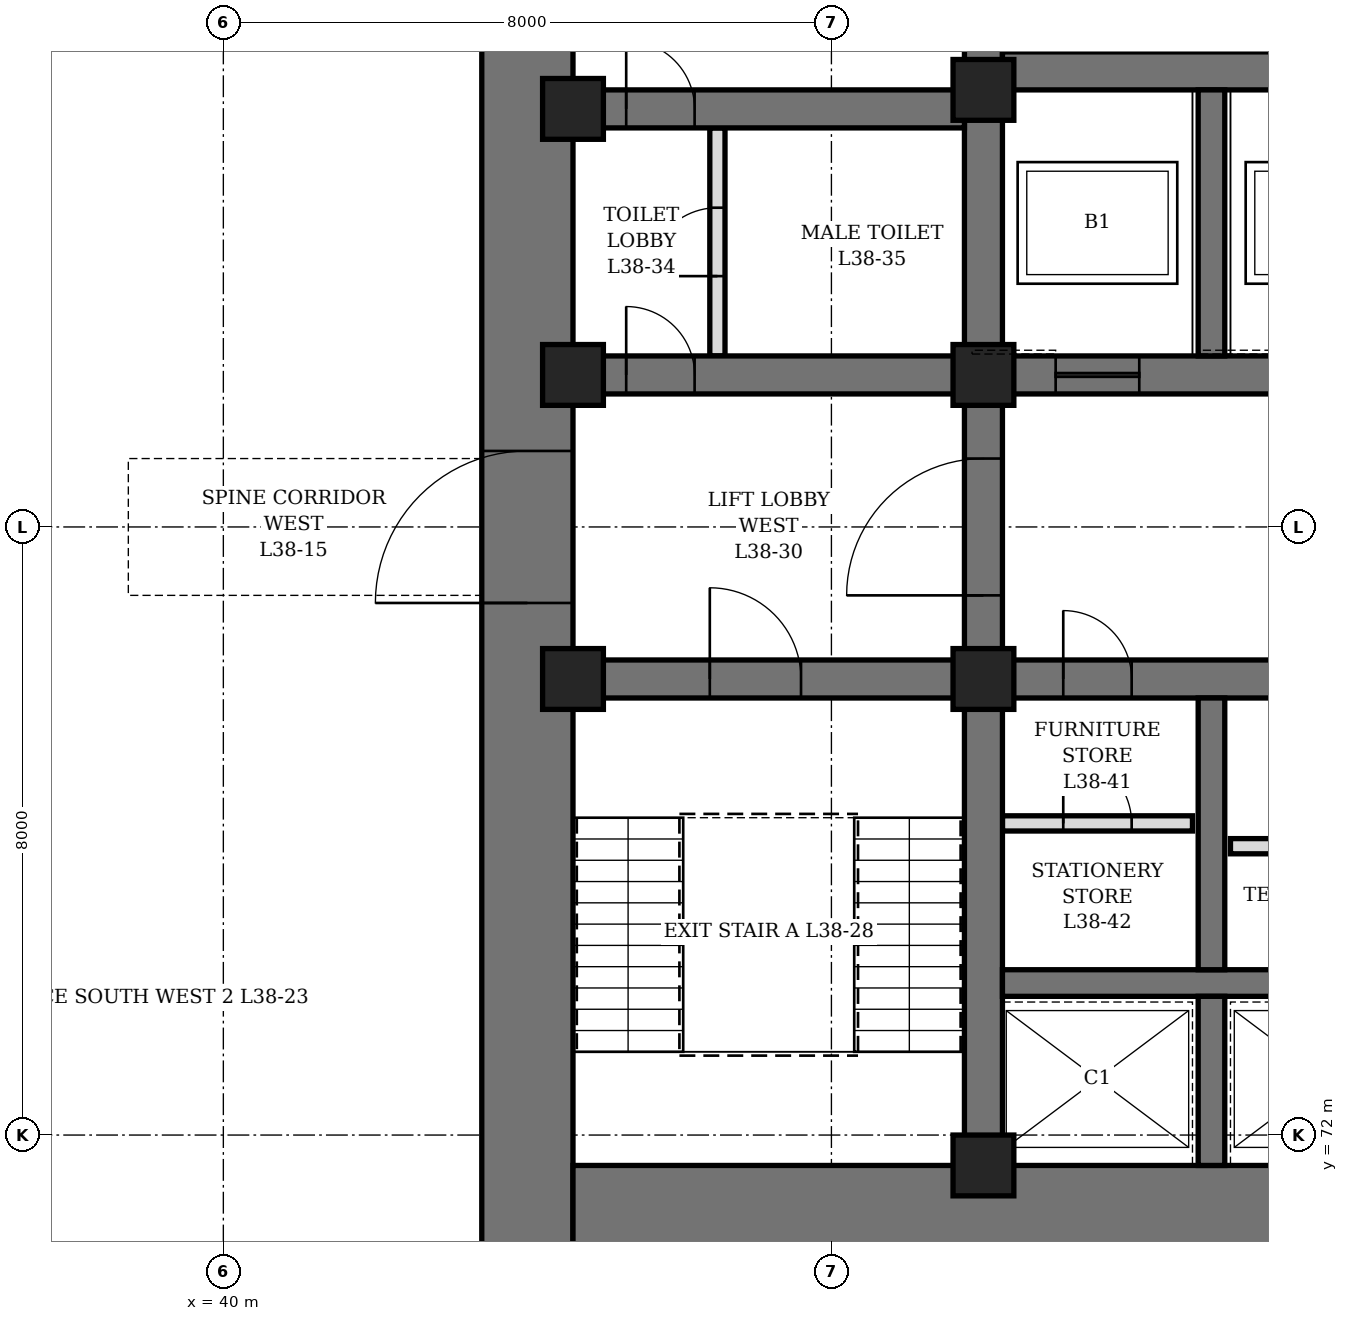
"""IFC4 building model, lengths in metres.
Left out: names, types, materials, properties, quantities, classifications, styles, units other than length and angle.
Written with IfcOpenShell. Run it as: python <this file> out.ifc"""

import sys

from ifc_helpers import new_model, si_unit, direction, frame, frame_2d, origin, origin_2d, place, context, subcontext, project, spatial, rectangle, hollow_rectangle, extrude, element, fill, save


model = new_model("IFC4")
c1 = context("Model", 3, precision=1e-05, world=origin(), true_north=direction((0.0, 1.0)))
c2 = subcontext(c1, "Body", "Model", "MODEL_VIEW")
j1 = project(units=[si_unit("LENGTHUNIT", "METRE"), si_unit("PLANEANGLEUNIT", "RADIAN")], contexts=[c1])
p1 = place(None, origin())
s1 = spatial("IfcSite", under=j1, at=p1, CompositionType="ELEMENT")
p2 = place(p1, origin())
s2 = spatial("IfcBuilding", under=s1, at=p2, CompositionType="ELEMENT")
p3 = place(p2, frame((0.0, 0.0, 171.1)))
s3 = spatial("IfcBuildingStorey", under=s2, at=p3, CompositionType="ELEMENT", Elevation=171.1)
p4 = place(p3, frame((44.0, 70.4, 0.0), z_axis=(0.0, 0.0, 1.0), x_axis=(0.0, 1.0, 0.0)))
e1 = element("IfcWall", 1, at=p4, inside=s3, PredefinedType="SHEAR", context=c2, shape_type="SweptSolid", body=[
    extrude(rectangle(XDim=19.2, YDim=1.2, at=frame_2d((9.6, 0.0))), origin(), (0.0, 0.0, 1.0), 4.2),
])
p5 = place(p4, frame((8.6, 0.0, 0.0)))
e2 = element("IfcOpeningElement", 2, at=p5, cuts=e1, PredefinedType="OPENING", context=c2, shape_type="SweptSolid", body=[
    extrude(rectangle(XDim=2.0, YDim=2.4, at=frame_2d((1.0, 1.2))), frame((0.0, 0.61, 0.0), z_axis=(0.0, -1.0, 0.0), x_axis=(1.0, 0.0, 0.0)), (0.0, 0.0, 1.0), 1.22),
])
p6 = place(p3, frame((44.6, 71.0, 0.0), z_axis=(0.0, 0.0, 1.0), x_axis=(1.0, 0.0, 0.0)))
e3 = element("IfcWall", 3, at=p6, inside=s3, PredefinedType="SHEAR", context=c2, shape_type="SweptSolid", body=[
    extrude(rectangle(XDim=22.8, YDim=1.2, at=frame_2d((11.4, 0.0))), origin(), (0.0, 0.0, 1.0), 4.2),
])
p7 = place(p3, frame((50.0, 71.6, 0.0), z_axis=(0.0, 0.0, 1.0), x_axis=(0.0, 1.0, 0.0)))
e4 = element("IfcWall", 4, at=p7, inside=s3, PredefinedType="SHEAR", context=c2, shape_type="SweptSolid", body=[
    extrude(rectangle(XDim=16.8, YDim=0.5, at=frame_2d((8.4, 0.0))), origin(), (0.0, 0.0, 1.0), 4.2),
])
p8 = place(p7, frame((7.5, 0.0, 0.0)))
e5 = element("IfcOpeningElement", 5, at=p8, cuts=e4, PredefinedType="OPENING", context=c2, shape_type="SweptSolid", body=[
    extrude(rectangle(XDim=1.8, YDim=2.4, at=frame_2d((0.9, 1.2))), frame((0.0, 0.26, 0.0), z_axis=(0.0, -1.0, 0.0), x_axis=(1.0, 0.0, 0.0)), (0.0, 0.0, 1.0), 0.52),
])
p9 = place(p3, frame((44.6, 78.0, 0.0), z_axis=(0.0, 0.0, 1.0), x_axis=(1.0, 0.0, 0.0)))
e6 = element("IfcWall", 6, at=p9, inside=s3, PredefinedType="SHEAR", context=c2, shape_type="SweptSolid", body=[
    extrude(rectangle(XDim=5.15, YDim=0.5, at=frame_2d((2.575, 0.0))), origin(), (0.0, 0.0, 1.0), 4.2),
])
p10 = place(p9, frame((1.8, 0.0, 0.0)))
e7 = element("IfcOpeningElement", 7, at=p10, cuts=e6, PredefinedType="OPENING", context=c2, shape_type="SweptSolid", body=[
    extrude(rectangle(XDim=1.2, YDim=2.1, at=frame_2d((0.6, 1.05))), frame((0.0, 0.26, 0.0), z_axis=(0.0, -1.0, 0.0), x_axis=(1.0, 0.0, 0.0)), (0.0, 0.0, 1.0), 0.52),
])
p11 = place(p3, frame((44.6, 82.0, 0.0), z_axis=(0.0, 0.0, 1.0), x_axis=(1.0, 0.0, 0.0)))
e8 = element("IfcWall", 8, at=p11, inside=s3, PredefinedType="SHEAR", context=c2, shape_type="SweptSolid", body=[
    extrude(rectangle(XDim=5.15, YDim=0.5, at=frame_2d((2.575, 0.0))), origin(), (0.0, 0.0, 1.0), 4.2),
])
p12 = place(p11, frame((0.7, 0.0, 0.0)))
e9 = element("IfcOpeningElement", 9, at=p12, cuts=e8, PredefinedType="OPENING", context=c2, shape_type="SweptSolid", body=[
    extrude(rectangle(XDim=0.9, YDim=2.1, at=frame_2d((0.45, 1.05))), frame((0.0, 0.26, 0.0), z_axis=(0.0, -1.0, 0.0), x_axis=(1.0, 0.0, 0.0)), (0.0, 0.0, 1.0), 0.52),
])
p13 = place(p3, frame((44.6, 85.5, 0.0), z_axis=(0.0, 0.0, 1.0), x_axis=(1.0, 0.0, 0.0)))
e10 = element("IfcWall", 10, at=p13, inside=s3, PredefinedType="SHEAR", context=c2, shape_type="SweptSolid", body=[
    extrude(rectangle(XDim=5.15, YDim=0.5, at=frame_2d((2.575, 0.0))), origin(), (0.0, 0.0, 1.0), 4.2),
])
p14 = place(p13, frame((0.7, 0.0, 0.0)))
e11 = element("IfcOpeningElement", 11, at=p14, cuts=e10, PredefinedType="OPENING", context=c2, shape_type="SweptSolid", body=[
    extrude(rectangle(XDim=0.9, YDim=2.1, at=frame_2d((0.45, 1.05))), frame((0.0, 0.26, 0.0), z_axis=(0.0, -1.0, 0.0), x_axis=(1.0, 0.0, 0.0)), (0.0, 0.0, 1.0), 0.52),
])
p15 = place(p3, frame((50.25, 78.0, 0.0), z_axis=(0.0, 0.0, 1.0), x_axis=(1.0, 0.0, 0.0)))
e12 = element("IfcWall", 12, at=p15, inside=s3, PredefinedType="SHEAR", context=c2, shape_type="SweptSolid", body=[
    extrude(rectangle(XDim=11.5, YDim=0.5, at=frame_2d((5.75, 0.0))), origin(), (0.0, 0.0, 1.0), 4.2),
])
p16 = place(p15, frame((0.8, 0.0, 0.0)))
e13 = element("IfcOpeningElement", 13, at=p16, cuts=e12, PredefinedType="OPENING", context=c2, shape_type="SweptSolid", body=[
    extrude(rectangle(XDim=0.9, YDim=2.1, at=frame_2d((0.45, 1.05))), frame((0.0, 0.26, 0.0), z_axis=(0.0, -1.0, 0.0), x_axis=(1.0, 0.0, 0.0)), (0.0, 0.0, 1.0), 0.52),
])
p17 = place(p15, frame((3.8, 0.0, 0.0)))
e14 = element("IfcOpeningElement", 14, at=p17, cuts=e12, PredefinedType="OPENING", context=c2, shape_type="SweptSolid", body=[
    extrude(rectangle(XDim=0.9, YDim=2.1, at=frame_2d((0.45, 1.05))), frame((0.0, 0.26, 0.0), z_axis=(0.0, -1.0, 0.0), x_axis=(1.0, 0.0, 0.0)), (0.0, 0.0, 1.0), 0.52),
])
p18 = place(p15, frame((6.8, 0.0, 0.0)))
e15 = element("IfcOpeningElement", 15, at=p18, cuts=e12, PredefinedType="OPENING", context=c2, shape_type="SweptSolid", body=[
    extrude(rectangle(XDim=0.9, YDim=2.1, at=frame_2d((0.45, 1.05))), frame((0.0, 0.26, 0.0), z_axis=(0.0, -1.0, 0.0), x_axis=(1.0, 0.0, 0.0)), (0.0, 0.0, 1.0), 0.52),
])
p19 = place(p15, frame((9.8, 0.0, 0.0)))
e16 = element("IfcOpeningElement", 16, at=p19, cuts=e12, PredefinedType="OPENING", context=c2, shape_type="SweptSolid", body=[
    extrude(rectangle(XDim=0.9, YDim=2.1, at=frame_2d((0.45, 1.05))), frame((0.0, 0.26, 0.0), z_axis=(0.0, -1.0, 0.0), x_axis=(1.0, 0.0, 0.0)), (0.0, 0.0, 1.0), 0.52),
])
p20 = place(p3, frame((50.25, 82.0, 0.0), z_axis=(0.0, 0.0, 1.0), x_axis=(1.0, 0.0, 0.0)))
e17 = element("IfcWall", 17, at=p20, inside=s3, PredefinedType="SHEAR", context=c2, shape_type="SweptSolid", body=[
    extrude(rectangle(XDim=11.5, YDim=0.5, at=frame_2d((5.75, 0.0))), origin(), (0.0, 0.0, 1.0), 4.2),
])
p21 = place(p20, frame((0.7, 0.0, 0.0)))
e18 = element("IfcOpeningElement", 18, at=p21, cuts=e17, PredefinedType="OPENING", context=c2, shape_type="SweptSolid", body=[
    extrude(rectangle(XDim=1.1, YDim=2.2, at=frame_2d((0.55, 1.1))), frame((0.0, 0.26, 0.0), z_axis=(0.0, -1.0, 0.0), x_axis=(1.0, 0.0, 0.0)), (0.0, 0.0, 1.0), 0.52),
])
p22 = place(p20, frame((3.7, 0.0, 0.0)))
e19 = element("IfcOpeningElement", 19, at=p22, cuts=e17, PredefinedType="OPENING", context=c2, shape_type="SweptSolid", body=[
    extrude(rectangle(XDim=1.1, YDim=2.2, at=frame_2d((0.55, 1.1))), frame((0.0, 0.26, 0.0), z_axis=(0.0, -1.0, 0.0), x_axis=(1.0, 0.0, 0.0)), (0.0, 0.0, 1.0), 0.52),
])
p23 = place(p20, frame((6.7, 0.0, 0.0)))
e20 = element("IfcOpeningElement", 20, at=p23, cuts=e17, PredefinedType="OPENING", context=c2, shape_type="SweptSolid", body=[
    extrude(rectangle(XDim=1.1, YDim=2.2, at=frame_2d((0.55, 1.1))), frame((0.0, 0.26, 0.0), z_axis=(0.0, -1.0, 0.0), x_axis=(1.0, 0.0, 0.0)), (0.0, 0.0, 1.0), 0.52),
])
p24 = place(p20, frame((9.7, 0.0, 0.0)))
e21 = element("IfcOpeningElement", 21, at=p24, cuts=e17, PredefinedType="OPENING", context=c2, shape_type="SweptSolid", body=[
    extrude(rectangle(XDim=1.1, YDim=2.2, at=frame_2d((0.55, 1.1))), frame((0.0, 0.26, 0.0), z_axis=(0.0, -1.0, 0.0), x_axis=(1.0, 0.0, 0.0)), (0.0, 0.0, 1.0), 0.52),
])
p25 = place(p3, frame((50.25, 86.0, 0.0), z_axis=(0.0, 0.0, 1.0), x_axis=(1.0, 0.0, 0.0)))
e22 = element("IfcWall", 22, at=p25, inside=s3, PredefinedType="SHEAR", context=c2, shape_type="SweptSolid", body=[
    extrude(rectangle(XDim=11.5, YDim=0.5, at=frame_2d((5.75, 0.0))), origin(), (0.0, 0.0, 1.0), 4.2),
])
p26 = place(p3, frame((50.25, 74.0, 0.0), z_axis=(0.0, 0.0, 1.0), x_axis=(1.0, 0.0, 0.0)))
e23 = element("IfcWall", 23, at=p26, inside=s3, PredefinedType="SHEAR", context=c2, shape_type="SweptSolid", body=[
    extrude(rectangle(XDim=11.5, YDim=0.35, at=frame_2d((5.75, 0.0))), origin(), (0.0, 0.0, 1.0), 4.2),
])
p27 = place(p3, frame((53.0, 71.6, 0.0), z_axis=(0.0, 0.0, 1.0), x_axis=(0.0, 1.0, 0.0)))
e24 = element("IfcWall", 24, at=p27, inside=s3, PredefinedType="SHEAR", context=c2, shape_type="SweptSolid", body=[
    extrude(rectangle(XDim=2.225, YDim=0.35, at=frame_2d((1.112, 0.0))), origin(), (0.0, 0.0, 1.0), 4.2),
])
p28 = place(p3, frame((53.0, 74.175, 0.0), z_axis=(0.0, 0.0, 1.0), x_axis=(0.0, 1.0, 0.0)))
e25 = element("IfcWall", 25, at=p28, inside=s3, PredefinedType="SHEAR", context=c2, shape_type="SweptSolid", body=[
    extrude(rectangle(XDim=3.575, YDim=0.35, at=frame_2d((1.788, 0.0))), origin(), (0.0, 0.0, 1.0), 4.2),
])
p29 = place(p3, frame((53.0, 82.25, 0.0), z_axis=(0.0, 0.0, 1.0), x_axis=(0.0, 1.0, 0.0)))
e26 = element("IfcWall", 26, at=p29, inside=s3, PredefinedType="SHEAR", context=c2, shape_type="SweptSolid", body=[
    extrude(rectangle(XDim=3.5, YDim=0.35, at=frame_2d((1.75, 0.0))), origin(), (0.0, 0.0, 1.0), 4.2),
])
for number, where, z_axis, x_axis in (
    (27, (44.6, 78.0, 0.0), (0.0, 0.0, 1.0), (1.0, 0.0, 0.0)),
    (28, (44.6, 82.0, 0.0), (0.0, 0.0, 1.0), (1.0, 0.0, 0.0)),
    (29, (44.6, 85.5, 0.0), (0.0, 0.0, 1.0), (1.0, 0.0, 0.0)),
    (30, (50.0, 71.6, 0.0), (0.0, 0.0, 1.0), (1.0, 0.0, 0.0)),
    (31, (50.0, 78.0, 0.0), (0.0, 0.0, 1.0), (1.0, 0.0, 0.0)),
    (32, (50.0, 82.0, 0.0), (0.0, 0.0, 1.0), (1.0, 0.0, 0.0)),
    (33, (50.0, 85.75, 0.0), (0.0, 0.0, 1.0), (1.0, 0.0, 0.0)),
):
    element("IfcColumn", number, at=place(p3, frame(where, z_axis=z_axis, x_axis=x_axis)), inside=s3, PredefinedType="COLUMN", context=c2, shape_type="SweptSolid", body=[
        extrude(hollow_rectangle(XDim=0.8, YDim=0.8, WallThickness=0.1, at=origin_2d()), origin(), (0.0, 0.0, 1.0), 4.2),
    ])
p30 = place(p3, frame((46.5, 82.25, 0.0), z_axis=(0.0, 0.0, 1.0), x_axis=(0.0, 1.0, 0.0)))
e34 = element("IfcWall", 34, at=p30, inside=s3, PredefinedType="PARTITIONING", context=c2, shape_type="SweptSolid", body=[
    extrude(rectangle(XDim=3.0, YDim=0.2, at=frame_2d((1.5, 0.0))), origin(), (0.0, 0.0, 1.0), 3.95),
])
p31 = place(p30, frame((1.05, 0.0, 0.0)))
e35 = element("IfcOpeningElement", 35, at=p31, cuts=e34, PredefinedType="OPENING", context=c2, shape_type="SweptSolid", body=[
    extrude(rectangle(XDim=0.9, YDim=2.1, at=frame_2d((0.45, 1.05))), frame((0.0, 0.11, 0.0), z_axis=(0.0, -1.0, 0.0), x_axis=(1.0, 0.0, 0.0)), (0.0, 0.0, 1.0), 0.22),
])
p32 = place(p3, frame((50.25, 76.1, 0.0), z_axis=(0.0, 0.0, 1.0), x_axis=(1.0, 0.0, 0.0)))
e36 = element("IfcWall", 36, at=p32, inside=s3, PredefinedType="PARTITIONING", context=c2, shape_type="SweptSolid", body=[
    extrude(rectangle(XDim=2.5, YDim=0.2, at=frame_2d((1.25, 0.0))), origin(), (0.0, 0.0, 1.0), 3.95),
])
p33 = place(p32, frame((0.8, 0.0, 0.0)))
e37 = element("IfcOpeningElement", 37, at=p33, cuts=e36, PredefinedType="OPENING", context=c2, shape_type="SweptSolid", body=[
    extrude(rectangle(XDim=0.9, YDim=2.1, at=frame_2d((0.45, 1.05))), frame((0.0, 0.11, 0.0), z_axis=(0.0, -1.0, 0.0), x_axis=(1.0, 0.0, 0.0)), (0.0, 0.0, 1.0), 0.22),
])
p34 = place(p3, frame((53.25, 75.8, 0.0), z_axis=(0.0, 0.0, 1.0), x_axis=(1.0, 0.0, 0.0)))
e38 = element("IfcWall", 38, at=p34, inside=s3, PredefinedType="PARTITIONING", context=c2, shape_type="SweptSolid", body=[
    extrude(rectangle(XDim=2.5, YDim=0.2, at=frame_2d((1.25, 0.0))), origin(), (0.0, 0.0, 1.0), 3.95),
])
p35 = place(p34, frame((0.8, 0.0, 0.0)))
e39 = element("IfcOpeningElement", 39, at=p35, cuts=e38, PredefinedType="OPENING", context=c2, shape_type="SweptSolid", body=[
    extrude(rectangle(XDim=0.9, YDim=2.1, at=frame_2d((0.45, 1.05))), frame((0.0, 0.11, 0.0), z_axis=(0.0, -1.0, 0.0), x_axis=(1.0, 0.0, 0.0)), (0.0, 0.0, 1.0), 0.22),
])
p36 = place(p12, origin())
e40 = element("IfcDoor", 40, at=p36, inside=s3, OperationType="SINGLE_SWING_LEFT", PredefinedType="DOOR", context=c2, shape_type="SweptSolid", body=[
    extrude(rectangle(XDim=0.9, YDim=2.1, at=frame_2d((0.45, 1.05))), frame((0.0, 0.25, 0.0), z_axis=(0.0, -1.0, 0.0), x_axis=(1.0, 0.0, 0.0)), (0.0, 0.0, 1.0), 0.5),
])
fill(e9, e40)
p37 = place(p31, origin())
e41 = element("IfcDoor", 41, at=p37, inside=s3, OperationType="SINGLE_SWING_RIGHT", PredefinedType="DOOR", context=c2, shape_type="SweptSolid", body=[
    extrude(rectangle(XDim=0.9, YDim=2.1, at=frame_2d((0.45, 1.05))), frame((0.0, 0.1, 0.0), z_axis=(0.0, -1.0, 0.0), x_axis=(1.0, 0.0, 0.0)), (0.0, 0.0, 1.0), 0.199),
])
fill(e35, e41)
p38 = place(p14, origin())
e42 = element("IfcDoor", 42, at=p38, inside=s3, OperationType="SINGLE_SWING_RIGHT", PredefinedType="DOOR", context=c2, shape_type="SweptSolid", body=[
    extrude(rectangle(XDim=0.9, YDim=2.1, at=frame_2d((0.45, 1.05))), frame((0.0, 0.25, 0.0), z_axis=(0.0, -1.0, 0.0), x_axis=(1.0, 0.0, 0.0)), (0.0, 0.0, 1.0), 0.5),
])
fill(e11, e42)
p39 = place(p16, origin())
e43 = element("IfcDoor", 43, at=p39, inside=s3, OperationType="SINGLE_SWING_LEFT", PredefinedType="DOOR", context=c2, shape_type="SweptSolid", body=[
    extrude(rectangle(XDim=0.9, YDim=2.1, at=frame_2d((0.45, 1.05))), frame((0.0, 0.25, 0.0), z_axis=(0.0, -1.0, 0.0), x_axis=(1.0, 0.0, 0.0)), (0.0, 0.0, 1.0), 0.5),
])
fill(e13, e43)
p40 = place(p33, origin())
e44 = element("IfcDoor", 44, at=p40, inside=s3, OperationType="SINGLE_SWING_LEFT", PredefinedType="DOOR", context=c2, shape_type="SweptSolid", body=[
    extrude(rectangle(XDim=0.9, YDim=2.1, at=frame_2d((0.45, 1.05))), frame((0.0, 0.1, 0.0), z_axis=(0.0, -1.0, 0.0), x_axis=(1.0, 0.0, 0.0)), (0.0, 0.0, 1.0), 0.199),
])
fill(e37, e44)
p41 = place(p10, origin())
e45 = element("IfcDoor", 45, at=p41, inside=s3, OperationType="SINGLE_SWING_LEFT", PredefinedType="DOOR", context=c2, shape_type="SweptSolid", body=[
    extrude(rectangle(XDim=1.2, YDim=2.1, at=frame_2d((0.6, 1.05))), frame((0.0, 0.25, 0.0), z_axis=(0.0, -1.0, 0.0), x_axis=(1.0, 0.0, 0.0)), (0.0, 0.0, 1.0), 0.5),
])
fill(e7, e45)
p42 = place(p5, origin())
e46 = element("IfcDoor", 46, at=p42, inside=s3, OperationType="DOUBLE_DOOR_SINGLE_SWING", PredefinedType="DOOR", context=c2, shape_type="SweptSolid", body=[
    extrude(rectangle(XDim=2.0, YDim=2.4, at=frame_2d((1.0, 1.2))), frame((0.0, 0.35, 0.0), z_axis=(0.0, -1.0, 0.0), x_axis=(1.0, 0.0, 0.0)), (0.0, 0.0, 1.0), 0.7),
])
fill(e2, e46)
p43 = place(p8, origin())
e47 = element("IfcDoor", 47, at=p43, inside=s3, OperationType="DOUBLE_DOOR_SINGLE_SWING", PredefinedType="DOOR", context=c2, shape_type="SweptSolid", body=[
    extrude(rectangle(XDim=1.8, YDim=2.4, at=frame_2d((0.9, 1.2))), frame((0.0, 0.25, 0.0), z_axis=(0.0, -1.0, 0.0), x_axis=(1.0, 0.0, 0.0)), (0.0, 0.0, 1.0), 0.5),
])
fill(e5, e47)
p44 = place(p21, origin())
e48 = element("IfcDoor", 48, at=p44, inside=s3, OperationType="SLIDING_TO_LEFT", PredefinedType="DOOR", context=c2, shape_type="SweptSolid", body=[
    extrude(rectangle(XDim=1.1, YDim=2.2, at=frame_2d((0.55, 1.1))), frame((0.0, 0.25, 0.0), z_axis=(0.0, -1.0, 0.0), x_axis=(1.0, 0.0, 0.0)), (0.0, 0.0, 1.0), 0.5),
])
fill(e18, e48)
save(model, sys.argv[1])
